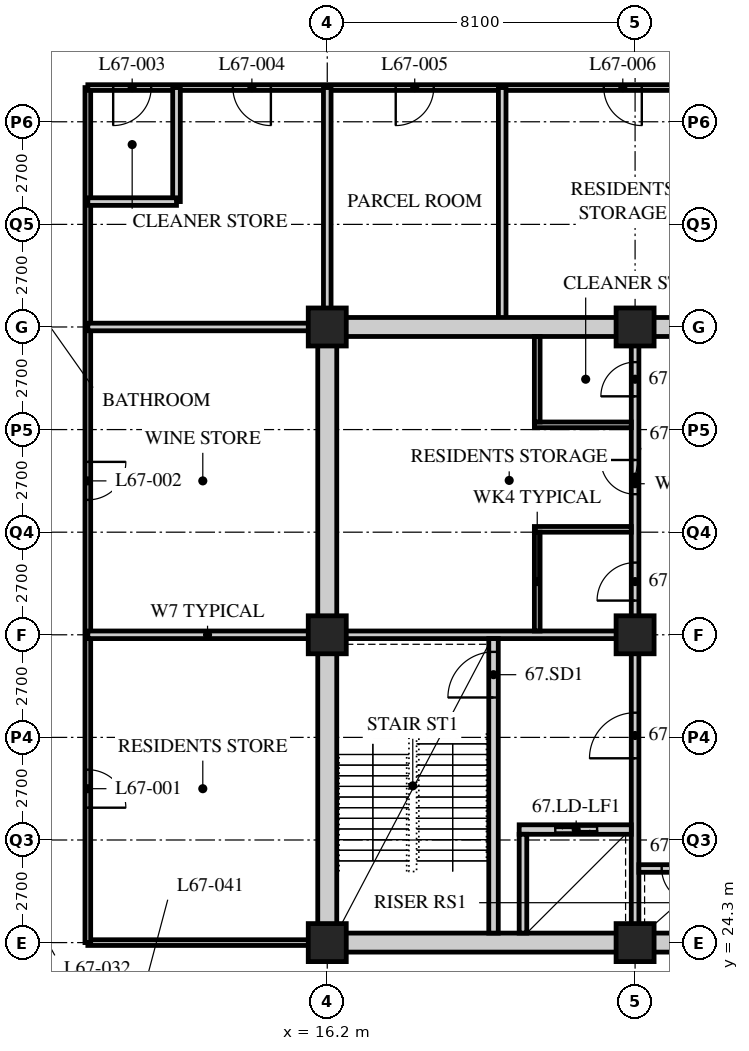
"""IFC4 building model, lengths in metres.
Left out: names, types, materials, properties, quantities, classifications, styles, units other than length and angle.
Written with IfcOpenShell. Run it as: python <this file> out.ifc"""

import sys

from ifc_helpers import new_model, si_unit, direction, frame, frame_2d, origin, origin_2d, place, context, subcontext, project, spatial, rectangle, hollow_rectangle, extrude, element, fill, save


model = new_model("IFC4")
c1 = context("Model", 3, precision=1e-05, world=origin(), true_north=direction((0.0, 1.0)))
c2 = subcontext(c1, "Body", "Model", "MODEL_VIEW")
j1 = project(units=[si_unit("LENGTHUNIT", "METRE"), si_unit("PLANEANGLEUNIT", "RADIAN")], contexts=[c1])
p1 = place(None, origin())
s1 = spatial("IfcSite", under=j1, at=p1, CompositionType="ELEMENT")
p2 = place(p1, origin())
s2 = spatial("IfcBuilding", under=s1, at=p2, CompositionType="ELEMENT")
p3 = place(p2, frame((0.0, 0.0, 261.9)))
s3 = spatial("IfcBuildingStorey", under=s2, at=p3, CompositionType="ELEMENT", Elevation=261.9)
for number, where, z_axis, x_axis in (
    (1, (16.2, 24.3, 0.0), (0.0, 0.0, 1.0), (1.0, 0.0, 0.0)),
    (2, (16.2, 32.4, 0.0), (0.0, 0.0, 1.0), (1.0, 0.0, 0.0)),
    (3, (16.2, 40.5, 0.0), (0.0, 0.0, 1.0), (1.0, 0.0, 0.0)),
    (4, (24.3, 24.3, 0.0), (0.0, 0.0, 1.0), (1.0, 0.0, 0.0)),
    (5, (24.3, 32.4, 0.0), (0.0, 0.0, 1.0), (1.0, 0.0, 0.0)),
    (6, (24.3, 40.5, 0.0), (0.0, 0.0, 1.0), (1.0, 0.0, 0.0)),
):
    element("IfcColumn", number, at=place(p3, frame(where, z_axis=z_axis, x_axis=x_axis)), inside=s3, PredefinedType="COLUMN", context=c2, shape_type="SweptSolid", body=[
        extrude(hollow_rectangle(XDim=1.0, YDim=1.0, WallThickness=0.1, at=origin_2d()), origin(), (0.0, 0.0, 1.0), 3.9),
    ])
p4 = place(p3, frame((16.0, 24.3, 0.0), z_axis=(0.0, 0.0, 1.0), x_axis=(-1.0, 0.0, 0.0)))
e7 = element("IfcWall", 7, at=p4, inside=s3, PredefinedType="PARTITIONING", context=c2, shape_type="SweptSolid", body=[
    extrude(rectangle(XDim=6.1, YDim=0.15, at=frame_2d((3.05, 0.0))), origin(), (0.0, 0.0, 1.0), 3.078),
])
p5 = place(p3, frame((9.9, 24.3, 0.0), z_axis=(0.0, 0.0, 1.0), x_axis=(0.0, 1.0, 0.0)))
e8 = element("IfcWall", 8, at=p5, inside=s3, PredefinedType="PARTITIONING", context=c2, shape_type="SweptSolid", body=[
    extrude(rectangle(XDim=22.5, YDim=0.15, at=frame_2d((11.25, 0.0))), origin(), (0.0, 0.0, 1.0), 3.69),
])
p6 = place(p5, frame((3.55, 0.0, 0.0)))
e9 = element("IfcOpeningElement", 9, at=p6, cuts=e8, PredefinedType="OPENING", context=c2, shape_type="SweptSolid", body=[
    extrude(rectangle(XDim=1.0, YDim=2.1, at=frame_2d((0.5, 1.05))), frame((0.0, 0.085, 0.0), z_axis=(0.0, -1.0, 0.0), x_axis=(1.0, 0.0, 0.0)), (0.0, 0.0, 1.0), 0.17),
])
p7 = place(p5, frame((11.65, 0.0, 0.0)))
e10 = element("IfcOpeningElement", 10, at=p7, cuts=e8, PredefinedType="OPENING", context=c2, shape_type="SweptSolid", body=[
    extrude(rectangle(XDim=1.0, YDim=2.1, at=frame_2d((0.5, 1.05))), frame((0.0, 0.085, 0.0), z_axis=(0.0, -1.0, 0.0), x_axis=(1.0, 0.0, 0.0)), (0.0, 0.0, 1.0), 0.17),
])
p8 = place(p3, frame((9.9, 46.8, 0.0), z_axis=(0.0, 0.0, 1.0), x_axis=(1.0, 0.0, 0.0)))
e11 = element("IfcWall", 11, at=p8, inside=s3, PredefinedType="PARTITIONING", context=c2, shape_type="SweptSolid", body=[
    extrude(rectangle(XDim=17.24, YDim=0.15, at=frame_2d((8.62, 0.0))), origin(), (0.0, 0.0, 1.0), 3.69),
])
p9 = place(p8, frame((0.667, 0.0, 0.0)))
e12 = element("IfcOpeningElement", 12, at=p9, cuts=e11, PredefinedType="OPENING", context=c2, shape_type="SweptSolid", body=[
    extrude(rectangle(XDim=1.0, YDim=2.1, at=frame_2d((0.5, 1.05))), frame((0.0, 0.085, 0.0), z_axis=(0.0, -1.0, 0.0), x_axis=(1.0, 0.0, 0.0)), (0.0, 0.0, 1.0), 0.17),
])
p10 = place(p8, frame((3.817, 0.0, 0.0)))
e13 = element("IfcOpeningElement", 13, at=p10, cuts=e11, PredefinedType="OPENING", context=c2, shape_type="SweptSolid", body=[
    extrude(rectangle(XDim=1.0, YDim=2.1, at=frame_2d((0.5, 1.05))), frame((0.0, 0.085, 0.0), z_axis=(0.0, -1.0, 0.0), x_axis=(1.0, 0.0, 0.0)), (0.0, 0.0, 1.0), 0.17),
])
p11 = place(p8, frame((8.102, 0.0, 0.0)))
e14 = element("IfcOpeningElement", 14, at=p11, cuts=e11, PredefinedType="OPENING", context=c2, shape_type="SweptSolid", body=[
    extrude(rectangle(XDim=1.0, YDim=2.1, at=frame_2d((0.5, 1.05))), frame((0.0, 0.085, 0.0), z_axis=(0.0, -1.0, 0.0), x_axis=(1.0, 0.0, 0.0)), (0.0, 0.0, 1.0), 0.17),
])
p12 = place(p8, frame((13.577, 0.0, 0.0)))
e15 = element("IfcOpeningElement", 15, at=p12, cuts=e11, PredefinedType="OPENING", context=c2, shape_type="SweptSolid", body=[
    extrude(rectangle(XDim=1.0, YDim=2.1, at=frame_2d((0.5, 1.05))), frame((0.0, 0.085, 0.0), z_axis=(0.0, -1.0, 0.0), x_axis=(1.0, 0.0, 0.0)), (0.0, 0.0, 1.0), 0.17),
])
for number, where, z_axis, x_axis in (
    (16, (9.9, 32.4, 0.0), (0.0, 0.0, 1.0), (1.0, 0.0, 0.0)),
    (17, (16.2, 40.5, 0.0), (0.0, 0.0, 1.0), (0.0, 1.0, 0.0)),
):
    element("IfcWall", number, at=place(p3, frame(where, z_axis=z_axis, x_axis=x_axis)), inside=s3, PredefinedType="SOLIDWALL", context=c2, shape_type="SweptSolid", body=[
        extrude(rectangle(XDim=6.3, YDim=0.2, at=frame_2d((3.15, 0.0))), origin(), (0.0, 0.0, 1.0), 3.078),
    ])
p13 = place(p3, frame((12.233, 46.8, 0.0), z_axis=(0.0, 0.0, 1.0), x_axis=(0.0, -1.0, 0.0)))
e18 = element("IfcWall", 18, at=p13, inside=s3, PredefinedType="SOLIDWALL", context=c2, shape_type="SweptSolid", body=[
    extrude(rectangle(XDim=3.0, YDim=0.2, at=frame_2d((1.5, 0.0))), origin(), (0.0, 0.0, 1.0), 3.69),
])
p14 = place(p3, frame((9.9, 43.8, 0.0), z_axis=(0.0, 0.0, 1.0), x_axis=(1.0, 0.0, 0.0)))
e19 = element("IfcWall", 19, at=p14, inside=s3, PredefinedType="SOLIDWALL", context=c2, shape_type="SweptSolid", body=[
    extrude(rectangle(XDim=2.333, YDim=0.2, at=frame_2d((1.167, 0.0))), origin(), (0.0, 0.0, 1.0), 3.69),
])
p15 = place(p3, frame((20.803, 46.8, 0.0), z_axis=(0.0, 0.0, 1.0), x_axis=(0.0, -1.0, 0.0)))
e20 = element("IfcWall", 20, at=p15, inside=s3, PredefinedType="SOLIDWALL", context=c2, shape_type="SweptSolid", body=[
    extrude(rectangle(XDim=6.3, YDim=0.2, at=frame_2d((3.15, 0.0))), origin(), (0.0, 0.0, 1.0), 3.69),
])
p16 = place(p3, frame((9.9, 40.5, 0.0), z_axis=(0.0, 0.0, 1.0), x_axis=(1.0, 0.0, 0.0)))
e21 = element("IfcWall", 21, at=p16, inside=s3, PredefinedType="SOLIDWALL", context=c2, shape_type="SweptSolid", body=[
    extrude(rectangle(XDim=6.3, YDim=0.2, at=frame_2d((3.15, 0.0))), origin(), (0.0, 0.0, 1.0), 3.078),
])
p17 = place(p3, frame((15.95, 24.3, 0.0), z_axis=(0.0, 0.0, 1.0), x_axis=(1.0, 0.0, 0.0)))
e22 = element("IfcWall", 22, at=p17, inside=s3, PredefinedType="SOLIDWALL", context=c2, shape_type="SweptSolid", body=[
    extrude(rectangle(XDim=24.55, YDim=0.5, at=frame_2d((12.275, 0.0))), origin(), (0.0, 0.0, 1.0), 3.04),
])
p18 = place(p17, frame((11.5, 0.0, 0.0)))
e23 = element("IfcOpeningElement", 23, at=p18, cuts=e22, PredefinedType="OPENING", context=c2, shape_type="SweptSolid", body=[
    extrude(rectangle(XDim=1.8, YDim=2.4, at=frame_2d((0.9, 1.2))), frame((0.0, 0.26, 0.0), z_axis=(0.0, -1.0, 0.0), x_axis=(1.0, 0.0, 0.0)), (0.0, 0.0, 1.0), 0.52),
])
p19 = place(p3, frame((15.95, 40.5, 0.0), z_axis=(0.0, 0.0, 1.0), x_axis=(1.0, 0.0, 0.0)))
e24 = element("IfcWall", 24, at=p19, inside=s3, PredefinedType="SOLIDWALL", context=c2, shape_type="SweptSolid", body=[
    extrude(rectangle(XDim=24.55, YDim=0.5, at=frame_2d((12.275, 0.0))), origin(), (0.0, 0.0, 1.0), 3.04),
])
p20 = place(p19, frame((11.5, 0.0, 0.0)))
e25 = element("IfcOpeningElement", 25, at=p20, cuts=e24, PredefinedType="OPENING", context=c2, shape_type="SweptSolid", body=[
    extrude(rectangle(XDim=1.8, YDim=2.4, at=frame_2d((0.9, 1.2))), frame((0.0, 0.26, 0.0), z_axis=(0.0, -1.0, 0.0), x_axis=(1.0, 0.0, 0.0)), (0.0, 0.0, 1.0), 0.52),
])
p21 = place(p3, frame((16.2, 24.55, 0.0), z_axis=(0.0, 0.0, 1.0), x_axis=(0.0, 1.0, 0.0)))
e26 = element("IfcWall", 26, at=p21, inside=s3, PredefinedType="SOLIDWALL", context=c2, shape_type="SweptSolid", body=[
    extrude(rectangle(XDim=15.7, YDim=0.5, at=frame_2d((7.85, 0.0))), origin(), (0.0, 0.0, 1.0), 3.078),
])
p22 = place(p3, frame((16.45, 32.4, 0.0), z_axis=(0.0, 0.0, 1.0), x_axis=(1.0, 0.0, 0.0)))
e27 = element("IfcWall", 27, at=p22, inside=s3, PredefinedType="SOLIDWALL", context=c2, shape_type="SweptSolid", body=[
    extrude(rectangle(XDim=7.95, YDim=0.2, at=frame_2d((3.975, 0.0))), origin(), (0.0, 0.0, 1.0), 3.078),
])
p23 = place(p3, frame((24.3, 24.55, 0.0), z_axis=(0.0, 0.0, 1.0), x_axis=(0.0, 1.0, 0.0)))
e28 = element("IfcWall", 28, at=p23, inside=s3, PredefinedType="SOLIDWALL", context=c2, shape_type="SweptSolid", body=[
    extrude(rectangle(XDim=7.75, YDim=0.2, at=frame_2d((3.875, 0.0))), origin(), (0.0, 0.0, 1.0), 3.078),
])
p24 = place(p23, frame((4.6, 0.0, 0.0)))
e29 = element("IfcOpeningElement", 29, at=p24, cuts=e28, PredefinedType="OPENING", context=c2, shape_type="SweptSolid", body=[
    extrude(rectangle(XDim=1.2, YDim=2.1, at=frame_2d((0.6, 1.05))), frame((0.0, 0.11, 0.0), z_axis=(0.0, -1.0, 0.0), x_axis=(1.0, 0.0, 0.0)), (0.0, 0.0, 1.0), 0.22),
])
p25 = place(p3, frame((20.575, 24.55, 0.0), z_axis=(0.0, 0.0, 1.0), x_axis=(0.0, 1.0, 0.0)))
e30 = element("IfcWall", 30, at=p25, inside=s3, PredefinedType="SOLIDWALL", context=c2, shape_type="SweptSolid", body=[
    extrude(rectangle(XDim=7.75, YDim=0.25, at=frame_2d((3.875, 0.0))), origin(), (0.0, 0.0, 1.0), 3.69),
])
p26 = place(p25, frame((6.2, 0.0, 0.0)))
e31 = element("IfcOpeningElement", 31, at=p26, cuts=e30, PredefinedType="OPENING", context=c2, shape_type="SweptSolid", body=[
    extrude(rectangle(XDim=1.2, YDim=2.1, at=frame_2d((0.6, 1.05))), frame((0.0, 0.135, 0.0), z_axis=(0.0, -1.0, 0.0), x_axis=(1.0, 0.0, 0.0)), (0.0, 0.0, 1.0), 0.27),
])
p27 = place(p3, frame((21.25, 27.275, 0.0), z_axis=(0.0, 0.0, 1.0), x_axis=(1.0, 0.0, 0.0)))
e32 = element("IfcWall", 32, at=p27, inside=s3, PredefinedType="SOLIDWALL", context=c2, shape_type="SweptSolid", body=[
    extrude(rectangle(XDim=2.95, YDim=0.25, at=frame_2d((1.475, 0.0))), origin(), (0.0, 0.0, 1.0), 3.69),
])
p28 = place(p27, frame((0.95, 0.0, 0.0)))
e33 = element("IfcOpeningElement", 33, at=p28, cuts=e32, PredefinedType="OPENING", context=c2, shape_type="SweptSolid", body=[
    extrude(rectangle(XDim=1.1, YDim=2.4, at=frame_2d((0.55, 1.2))), frame((0.0, 0.135, 0.0), z_axis=(0.0, -1.0, 0.0), x_axis=(1.0, 0.0, 0.0)), (0.0, 0.0, 1.0), 0.27),
])
p29 = place(p3, frame((21.35, 24.55, 0.0), z_axis=(0.0, 0.0, 1.0), x_axis=(0.0, 1.0, 0.0)))
e34 = element("IfcWall", 34, at=p29, inside=s3, PredefinedType="SOLIDWALL", context=c2, shape_type="SweptSolid", body=[
    extrude(rectangle(XDim=2.6, YDim=0.2, at=frame_2d((1.3, 0.0))), origin(), (0.0, 0.0, 1.0), 3.69),
])
p30 = place(p3, frame((24.4, 26.25, 0.0), z_axis=(0.0, 0.0, 1.0), x_axis=(1.0, 0.0, 0.0)))
e35 = element("IfcWall", 35, at=p30, inside=s3, PredefinedType="SOLIDWALL", context=c2, shape_type="SweptSolid", body=[
    extrude(rectangle(XDim=2.15, YDim=0.2, at=frame_2d((1.075, 0.0))), origin(), (0.0, 0.0, 1.0), 3.69),
])
p31 = place(p30, frame((0.6, 0.0, 0.0)))
e36 = element("IfcOpeningElement", 36, at=p31, cuts=e35, PredefinedType="OPENING", context=c2, shape_type="SweptSolid", body=[
    extrude(rectangle(XDim=0.9, YDim=2.1, at=frame_2d((0.45, 1.05))), frame((0.0, 0.11, 0.0), z_axis=(0.0, -1.0, 0.0), x_axis=(1.0, 0.0, 0.0)), (0.0, 0.0, 1.0), 0.22),
])
p32 = place(p3, frame((24.3, 32.5, 0.0), z_axis=(0.0, 0.0, 1.0), x_axis=(0.0, 1.0, 0.0)))
e37 = element("IfcWall", 37, at=p32, inside=s3, PredefinedType="PARTITIONING", context=c2, shape_type="SweptSolid", body=[
    extrude(rectangle(XDim=7.75, YDim=0.2, at=frame_2d((3.875, 0.0))), origin(), (0.0, 0.0, 1.0), 3.078),
])
p33 = place(p32, frame((0.8, 0.0, 0.0)))
e38 = element("IfcOpeningElement", 38, at=p33, cuts=e37, PredefinedType="OPENING", context=c2, shape_type="SweptSolid", body=[
    extrude(rectangle(XDim=1.0, YDim=2.1, at=frame_2d((0.5, 1.05))), frame((0.0, 0.11, 0.0), z_axis=(0.0, -1.0, 0.0), x_axis=(1.0, 0.0, 0.0)), (0.0, 0.0, 1.0), 0.22),
])
p34 = place(p32, frame((3.6, 0.0, 0.0)))
e39 = element("IfcOpeningElement", 39, at=p34, cuts=e37, PredefinedType="OPENING", context=c2, shape_type="SweptSolid", body=[
    extrude(rectangle(XDim=0.9, YDim=2.1, at=frame_2d((0.45, 1.05))), frame((0.0, 0.11, 0.0), z_axis=(0.0, -1.0, 0.0), x_axis=(1.0, 0.0, 0.0)), (0.0, 0.0, 1.0), 0.22),
])
p35 = place(p32, frame((6.175, 0.0, 0.0)))
e40 = element("IfcOpeningElement", 40, at=p35, cuts=e37, PredefinedType="OPENING", context=c2, shape_type="SweptSolid", body=[
    extrude(rectangle(XDim=0.9, YDim=2.1, at=frame_2d((0.45, 1.05))), frame((0.0, 0.11, 0.0), z_axis=(0.0, -1.0, 0.0), x_axis=(1.0, 0.0, 0.0)), (0.0, 0.0, 1.0), 0.22),
])
for number, where, z_axis, x_axis in (
    (41, (21.65, 35.175, 0.0), (0.0, 0.0, 1.0), (1.0, 0.0, 0.0)),
    (42, (21.65, 37.925, 0.0), (0.0, 0.0, 1.0), (1.0, 0.0, 0.0)),
):
    element("IfcWall", number, at=place(p3, frame(where, z_axis=z_axis, x_axis=x_axis)), inside=s3, PredefinedType="PARTITIONING", context=c2, shape_type="SweptSolid", body=[
        extrude(rectangle(XDim=2.55, YDim=0.15, at=frame_2d((1.275, 0.0))), origin(), (0.0, 0.0, 1.0), 3.69),
    ])
p36 = place(p3, frame((21.725, 32.5, 0.0), z_axis=(0.0, 0.0, 1.0), x_axis=(0.0, 1.0, 0.0)))
e43 = element("IfcWall", 43, at=p36, inside=s3, PredefinedType="PARTITIONING", context=c2, shape_type="SweptSolid", body=[
    extrude(rectangle(XDim=2.6, YDim=0.15, at=frame_2d((1.3, 0.0))), origin(), (0.0, 0.0, 1.0), 3.69),
])
p37 = place(p3, frame((21.725, 38.0, 0.0), z_axis=(0.0, 0.0, 1.0), x_axis=(0.0, 1.0, 0.0)))
e44 = element("IfcWall", 44, at=p37, inside=s3, PredefinedType="PARTITIONING", context=c2, shape_type="SweptSolid", body=[
    extrude(rectangle(XDim=2.25, YDim=0.15, at=frame_2d((1.125, 0.0))), origin(), (0.0, 0.0, 1.0), 3.69),
])
p38 = place(p6, origin())
e45 = element("IfcDoor", 45, at=p38, inside=s3, OperationType="SINGLE_SWING_RIGHT", PredefinedType="DOOR", context=c2, shape_type="SweptSolid", body=[
    extrude(rectangle(XDim=1.0, YDim=2.1, at=frame_2d((0.5, 1.05))), frame((0.0, 0.025, 0.0), z_axis=(0.0, -1.0, 0.0), x_axis=(1.0, 0.0, 0.0)), (0.0, 0.0, 1.0), 0.05),
])
fill(e9, e45)
p39 = place(p7, origin())
e46 = element("IfcDoor", 46, at=p39, inside=s3, OperationType="SINGLE_SWING_LEFT", PredefinedType="DOOR", context=c2, shape_type="SweptSolid", body=[
    extrude(rectangle(XDim=1.0, YDim=2.1, at=frame_2d((0.5, 1.05))), frame((0.0, 0.025, 0.0), z_axis=(0.0, -1.0, 0.0), x_axis=(1.0, 0.0, 0.0)), (0.0, 0.0, 1.0), 0.05),
])
fill(e10, e46)
p40 = place(p9, origin())
e47 = element("IfcDoor", 47, at=p40, inside=s3, OperationType="SINGLE_SWING_RIGHT", PredefinedType="DOOR", context=c2, shape_type="SweptSolid", body=[
    extrude(rectangle(XDim=1.0, YDim=2.1, at=frame_2d((0.5, 1.05))), frame((0.0, 0.025, 0.0), z_axis=(0.0, -1.0, 0.0), x_axis=(1.0, 0.0, 0.0)), (0.0, 0.0, 1.0), 0.05),
])
fill(e12, e47)
p41 = place(p10, origin())
e48 = element("IfcDoor", 48, at=p41, inside=s3, OperationType="SINGLE_SWING_LEFT", PredefinedType="DOOR", context=c2, shape_type="SweptSolid", body=[
    extrude(rectangle(XDim=1.0, YDim=2.1, at=frame_2d((0.5, 1.05))), frame((0.0, 0.025, 0.0), z_axis=(0.0, -1.0, 0.0), x_axis=(1.0, 0.0, 0.0)), (0.0, 0.0, 1.0), 0.05),
])
fill(e13, e48)
p42 = place(p11, origin())
e49 = element("IfcDoor", 49, at=p42, inside=s3, OperationType="SINGLE_SWING_RIGHT", PredefinedType="DOOR", context=c2, shape_type="SweptSolid", body=[
    extrude(rectangle(XDim=1.0, YDim=2.1, at=frame_2d((0.5, 1.05))), frame((0.0, 0.025, 0.0), z_axis=(0.0, -1.0, 0.0), x_axis=(1.0, 0.0, 0.0)), (0.0, 0.0, 1.0), 0.05),
])
fill(e14, e49)
p43 = place(p12, origin())
e50 = element("IfcDoor", 50, at=p43, inside=s3, OperationType="SINGLE_SWING_LEFT", PredefinedType="DOOR", context=c2, shape_type="SweptSolid", body=[
    extrude(rectangle(XDim=1.0, YDim=2.1, at=frame_2d((0.5, 1.05))), frame((0.0, 0.025, 0.0), z_axis=(0.0, -1.0, 0.0), x_axis=(1.0, 0.0, 0.0)), (0.0, 0.0, 1.0), 0.05),
])
fill(e15, e50)
p44 = place(p33, origin())
e51 = element("IfcDoor", 51, at=p44, inside=s3, OperationType="SINGLE_SWING_LEFT", PredefinedType="DOOR", context=c2, shape_type="SweptSolid", body=[
    extrude(rectangle(XDim=1.0, YDim=2.1, at=frame_2d((0.5, 1.05))), frame((0.0, 0.025, 0.0), z_axis=(0.0, -1.0, 0.0), x_axis=(1.0, 0.0, 0.0)), (0.0, 0.0, 1.0), 0.05),
])
fill(e38, e51)
p45 = place(p34, origin())
e52 = element("IfcDoor", 52, at=p45, inside=s3, OperationType="SINGLE_SWING_RIGHT", PredefinedType="DOOR", context=c2, shape_type="SweptSolid", body=[
    extrude(rectangle(XDim=0.9, YDim=2.1, at=frame_2d((0.45, 1.05))), frame((0.0, 0.025, 0.0), z_axis=(0.0, -1.0, 0.0), x_axis=(1.0, 0.0, 0.0)), (0.0, 0.0, 1.0), 0.05),
])
fill(e39, e52)
p46 = place(p35, origin())
e53 = element("IfcDoor", 53, at=p46, inside=s3, OperationType="SINGLE_SWING_LEFT", PredefinedType="DOOR", context=c2, shape_type="SweptSolid", body=[
    extrude(rectangle(XDim=0.9, YDim=2.1, at=frame_2d((0.45, 1.05))), frame((0.0, 0.025, 0.0), z_axis=(0.0, -1.0, 0.0), x_axis=(1.0, 0.0, 0.0)), (0.0, 0.0, 1.0), 0.05),
])
fill(e40, e53)
p47 = place(p26, origin())
e54 = element("IfcDoor", 54, at=p47, inside=s3, OperationType="SINGLE_SWING_LEFT", PredefinedType="DOOR", context=c2, shape_type="SweptSolid", body=[
    extrude(rectangle(XDim=1.2, YDim=2.1, at=frame_2d((0.6, 1.05))), frame((0.0, 0.025, 0.0), z_axis=(0.0, -1.0, 0.0), x_axis=(1.0, 0.0, 0.0)), (0.0, 0.0, 1.0), 0.05),
])
fill(e31, e54)
p48 = place(p24, origin())
e55 = element("IfcDoor", 55, at=p48, inside=s3, OperationType="SINGLE_SWING_LEFT", PredefinedType="DOOR", context=c2, shape_type="SweptSolid", body=[
    extrude(rectangle(XDim=1.2, YDim=2.1, at=frame_2d((0.6, 1.05))), frame((0.0, 0.025, 0.0), z_axis=(0.0, -1.0, 0.0), x_axis=(1.0, 0.0, 0.0)), (0.0, 0.0, 1.0), 0.05),
])
fill(e29, e55)
p49 = place(p31, origin())
e56 = element("IfcDoor", 56, at=p49, inside=s3, OperationType="SINGLE_SWING_LEFT", PredefinedType="DOOR", context=c2, shape_type="SweptSolid", body=[
    extrude(rectangle(XDim=0.9, YDim=2.1, at=frame_2d((0.45, 1.05))), frame((0.0, 0.025, 0.0), z_axis=(0.0, -1.0, 0.0), x_axis=(1.0, 0.0, 0.0)), (0.0, 0.0, 1.0), 0.05),
])
fill(e36, e56)
p50 = place(p28, origin())
e57 = element("IfcDoor", 57, at=p50, inside=s3, OperationType="DOUBLE_DOOR_SLIDING", PredefinedType="DOOR", context=c2, shape_type="SweptSolid", body=[
    extrude(rectangle(XDim=1.1, YDim=2.4, at=frame_2d((0.55, 1.2))), frame((0.0, 0.025, 0.0), z_axis=(0.0, -1.0, 0.0), x_axis=(1.0, 0.0, 0.0)), (0.0, 0.0, 1.0), 0.05),
])
fill(e33, e57)
save(model, sys.argv[1])
